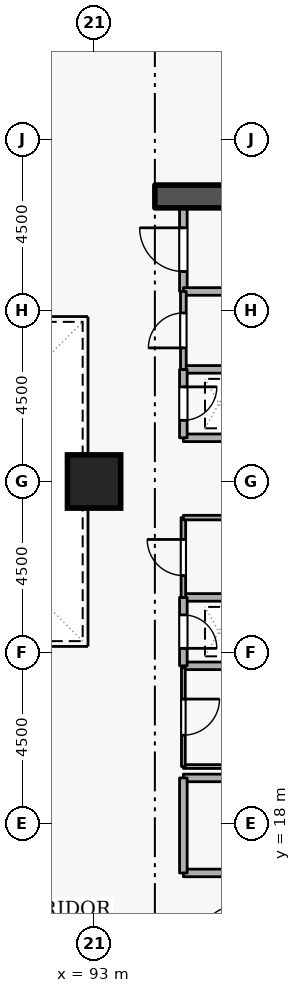
"""IFC4 building model, lengths in metres.
Left out: names, types, materials, properties, quantities, classifications, styles, units other than length and angle.
Written with IfcOpenShell. Run it as: python <this file> out.ifc"""

import sys

from ifc_helpers import new_model, si_unit, direction, frame, frame_2d, origin, origin_2d, place, context, subcontext, project, spatial, rectangle, extrude, element, fill, save


model = new_model("IFC4")
c1 = context("Model", 3, precision=1e-05, world=origin(), true_north=direction((0.0, 1.0)))
c2 = subcontext(c1, "Body", "Model", "MODEL_VIEW")
j1 = project(units=[si_unit("LENGTHUNIT", "METRE"), si_unit("PLANEANGLEUNIT", "RADIAN")], contexts=[c1])
p1 = place(None, origin())
s1 = spatial("IfcSite", under=j1, at=p1, CompositionType="ELEMENT")
p2 = place(p1, origin())
s2 = spatial("IfcBuilding", under=s1, at=p2, CompositionType="ELEMENT")
p3 = place(p2, frame((0.0, 0.0, 9.6)))
s3 = spatial("IfcBuildingStorey", under=s2, at=p3, CompositionType="ELEMENT", Elevation=9.6)
p4 = place(p3, frame((94.6, 34.5, 0.0), z_axis=(0.0, 0.0, 1.0), x_axis=(1.0, 0.0, 0.0)))
e1 = element("IfcWall", 1, at=p4, inside=s3, PredefinedType="SHEAR", context=c2, shape_type="SweptSolid", body=[
    extrude(rectangle(XDim=5.7, YDim=0.6, at=frame_2d((2.85, 0.0))), origin(), (0.0, 0.0, 1.0), 4.5),
])
p5 = place(p3, frame((93.0, 27.0, 0.0), z_axis=(0.0, 0.0, 1.0), x_axis=(1.0, 0.0, 0.0)))
e2 = element("IfcColumn", 2, at=p5, inside=s3, PredefinedType="COLUMN", context=c2, shape_type="SweptSolid", body=[
    extrude(rectangle(XDim=1.4, YDim=1.4, at=origin_2d()), origin(), (0.0, 0.0, 1.0), 4.5),
])
p6 = place(p3, frame((95.35, 16.7, 0.0), z_axis=(0.0, 0.0, 1.0), x_axis=(1.0, 0.0, 0.0)))
e3 = element("IfcWall", 3, at=p6, inside=s3, PredefinedType="STANDARD", context=c2, shape_type="SweptSolid", body=[
    extrude(rectangle(XDim=5.15, YDim=0.2, at=frame_2d((2.575, 0.0))), origin(), (0.0, 0.0, 1.0), 4.16),
])
p7 = place(p6, frame((2.0, 0.0, 0.0)))
e4 = element("IfcOpeningElement", 4, at=p7, cuts=e3, PredefinedType="OPENING", context=c2, shape_type="SweptSolid", body=[
    extrude(rectangle(XDim=1.15, YDim=2.1, at=frame_2d((0.575, 1.05))), frame((0.0, 0.11, 0.0), z_axis=(0.0, -1.0, 0.0), x_axis=(1.0, 0.0, 0.0)), (0.0, 0.0, 1.0), 0.22),
])
p8 = place(p3, frame((97.1, 19.2, 0.0), z_axis=(0.0, 0.0, 1.0), x_axis=(-1.0, 0.0, 0.0)))
e5 = element("IfcWall", 5, at=p8, inside=s3, PredefinedType="STANDARD", context=c2, shape_type="SweptSolid", body=[
    extrude(rectangle(XDim=1.75, YDim=0.2, at=frame_2d((0.875, 0.0))), origin(), (0.0, 0.0, 1.0), 3.365),
])
p9 = place(p3, frame((95.35, 19.2, 0.0), z_axis=(0.0, 0.0, 1.0), x_axis=(0.0, -1.0, 0.0)))
e6 = element("IfcWall", 6, at=p9, inside=s3, PredefinedType="STANDARD", context=c2, shape_type="SweptSolid", body=[
    extrude(rectangle(XDim=2.5, YDim=0.2, at=frame_2d((1.25, 0.0))), origin(), (0.0, 0.0, 1.0), 4.16),
])
for number, where, z_axis, x_axis in (
    (7, (95.35, 28.15, 0.0), (0.0, 0.0, 1.0), (1.0, 0.0, 0.0)),
    (8, (96.85, 29.95, 0.0), (0.0, 0.0, 1.0), (-1.0, 0.0, 0.0)),
):
    element("IfcWall", number, at=place(p3, frame(where, z_axis=z_axis, x_axis=x_axis)), inside=s3, PredefinedType="STANDARD", context=c2, shape_type="SweptSolid", body=[
        extrude(rectangle(XDim=1.5, YDim=0.2, at=frame_2d((0.75, 0.0))), origin(), (0.0, 0.0, 1.0), 4.16),
    ])
p10 = place(p3, frame((95.35, 29.95, 0.0), z_axis=(0.0, 0.0, 1.0), x_axis=(0.0, -1.0, 0.0)))
e9 = element("IfcWall", 9, at=p10, inside=s3, PredefinedType="STANDARD", context=c2, shape_type="SweptSolid", body=[
    extrude(rectangle(XDim=1.8, YDim=0.2, at=frame_2d((0.9, 0.0))), origin(), (0.0, 0.0, 1.0), 4.16),
])
p11 = place(p10, frame((0.46, 0.0, 0.0)))
e10 = element("IfcOpeningElement", 10, at=p11, cuts=e9, PredefinedType="OPENING", context=c2, shape_type="SweptSolid", body=[
    extrude(rectangle(XDim=0.88, YDim=2.04, at=frame_2d((0.44, 1.02))), frame((0.0, 0.11, 0.0), z_axis=(0.0, -1.0, 0.0), x_axis=(1.0, 0.0, 0.0)), (0.0, 0.0, 1.0), 0.22),
])
for number, where, z_axis, x_axis in (
    (11, (95.35, 22.15, 0.0), (0.0, 0.0, 1.0), (1.0, 0.0, 0.0)),
    (12, (96.85, 23.95, 0.0), (0.0, 0.0, 1.0), (-1.0, 0.0, 0.0)),
):
    element("IfcWall", number, at=place(p3, frame(where, z_axis=z_axis, x_axis=x_axis)), inside=s3, PredefinedType="STANDARD", context=c2, shape_type="SweptSolid", body=[
        extrude(rectangle(XDim=1.5, YDim=0.2, at=frame_2d((0.75, 0.0))), origin(), (0.0, 0.0, 1.0), 4.16),
    ])
p12 = place(p3, frame((95.35, 23.95, 0.0), z_axis=(0.0, 0.0, 1.0), x_axis=(0.0, -1.0, 0.0)))
e13 = element("IfcWall", 13, at=p12, inside=s3, PredefinedType="STANDARD", context=c2, shape_type="SweptSolid", body=[
    extrude(rectangle(XDim=1.8, YDim=0.2, at=frame_2d((0.9, 0.0))), origin(), (0.0, 0.0, 1.0), 4.16),
])
p13 = place(p12, frame((0.46, 0.0, 0.0)))
e14 = element("IfcOpeningElement", 14, at=p13, cuts=e13, PredefinedType="OPENING", context=c2, shape_type="SweptSolid", body=[
    extrude(rectangle(XDim=0.88, YDim=2.04, at=frame_2d((0.44, 1.02))), frame((0.0, 0.11, 0.0), z_axis=(0.0, -1.0, 0.0), x_axis=(1.0, 0.0, 0.0)), (0.0, 0.0, 1.0), 0.22),
])
p14 = place(p3, frame((95.35, 32.0, 0.0), z_axis=(0.0, 0.0, 1.0), x_axis=(0.0, 1.0, 0.0)))
e15 = element("IfcWall", 15, at=p14, inside=s3, PredefinedType="STANDARD", context=c2, shape_type="SweptSolid", body=[
    extrude(rectangle(XDim=2.2, YDim=0.2, at=frame_2d((1.1, 0.0))), origin(), (0.0, 0.0, 1.0), 4.16),
])
p15 = place(p14, frame((0.525, 0.0, 0.0)))
e16 = element("IfcOpeningElement", 16, at=p15, cuts=e15, PredefinedType="OPENING", context=c2, shape_type="SweptSolid", body=[
    extrude(rectangle(XDim=1.15, YDim=2.1, at=frame_2d((0.575, 1.05))), frame((0.0, 0.11, 0.0), z_axis=(0.0, -1.0, 0.0), x_axis=(1.0, 0.0, 0.0)), (0.0, 0.0, 1.0), 0.22),
])
p16 = place(p3, frame((96.85, 32.0, 0.0), z_axis=(0.0, 0.0, 1.0), x_axis=(-1.0, 0.0, 0.0)))
e17 = element("IfcWall", 17, at=p16, inside=s3, PredefinedType="STANDARD", context=c2, shape_type="SweptSolid", body=[
    extrude(rectangle(XDim=1.5, YDim=0.2, at=frame_2d((0.75, 0.0))), origin(), (0.0, 0.0, 1.0), 4.16),
])
p17 = place(p3, frame((95.35, 19.5, 0.0), z_axis=(0.0, 0.0, 1.0), x_axis=(1.0, 0.0, 0.0)))
e18 = element("IfcWall", 18, at=p17, inside=s3, PredefinedType="PARTITIONING", context=c2, shape_type="SweptSolid", body=[
    extrude(rectangle(XDim=1.5, YDim=0.1, at=frame_2d((0.75, 0.0))), origin(), (0.0, 0.0, 1.0), 3.365),
])
p18 = place(p3, frame((95.35, 22.1, 0.0), z_axis=(0.0, 0.0, 1.0), x_axis=(0.0, -1.0, 0.0)))
e19 = element("IfcWall", 19, at=p18, inside=s3, PredefinedType="PARTITIONING", context=c2, shape_type="SweptSolid", body=[
    extrude(rectangle(XDim=2.6, YDim=0.1, at=frame_2d((1.3, 0.0))), origin(), (0.0, 0.0, 1.0), 4.16),
])
p19 = place(p18, frame((0.825, 0.0, 0.0)))
e20 = element("IfcOpeningElement", 20, at=p19, cuts=e19, PredefinedType="OPENING", context=c2, shape_type="SweptSolid", body=[
    extrude(rectangle(XDim=0.95, YDim=2.1, at=frame_2d((0.475, 1.05))), frame((0.0, 0.06, 0.0), z_axis=(0.0, -1.0, 0.0), x_axis=(1.0, 0.0, 0.0)), (0.0, 0.0, 1.0), 0.12),
])
p20 = place(p3, frame((95.35, 23.95, 0.0), z_axis=(0.0, 0.0, 1.0), x_axis=(0.0, 1.0, 0.0)))
e21 = element("IfcWall", 21, at=p20, inside=s3, PredefinedType="PARTITIONING", context=c2, shape_type="SweptSolid", body=[
    extrude(rectangle(XDim=2.1, YDim=0.12, at=frame_2d((1.05, 0.0))), origin(), (0.0, 0.0, 1.0), 4.16),
])
p21 = place(p20, frame((0.575, 0.0, 0.0)))
e22 = element("IfcOpeningElement", 22, at=p21, cuts=e21, PredefinedType="OPENING", context=c2, shape_type="SweptSolid", body=[
    extrude(rectangle(XDim=0.95, YDim=2.1, at=frame_2d((0.475, 1.05))), frame((0.0, 0.07, 0.0), z_axis=(0.0, -1.0, 0.0), x_axis=(1.0, 0.0, 0.0)), (0.0, 0.0, 1.0), 0.14),
])
p22 = place(p3, frame((95.35, 26.05, 0.0), z_axis=(0.0, 0.0, 1.0), x_axis=(1.0, 0.0, 0.0)))
e23 = element("IfcWall", 23, at=p22, inside=s3, PredefinedType="PARTITIONING", context=c2, shape_type="SweptSolid", body=[
    extrude(rectangle(XDim=1.5, YDim=0.12, at=frame_2d((0.75, 0.0))), origin(), (0.0, 0.0, 1.0), 4.16),
])
p23 = place(p3, frame((95.35, 29.95, 0.0), z_axis=(0.0, 0.0, 1.0), x_axis=(0.0, 1.0, 0.0)))
e24 = element("IfcWall", 24, at=p23, inside=s3, PredefinedType="PARTITIONING", context=c2, shape_type="SweptSolid", body=[
    extrude(rectangle(XDim=2.05, YDim=0.15, at=frame_2d((1.025, 0.0))), origin(), (0.0, 0.0, 1.0), 4.16),
])
p24 = place(p23, frame((0.565, 0.0, 0.0)))
e25 = element("IfcOpeningElement", 25, at=p24, cuts=e24, PredefinedType="OPENING", context=c2, shape_type="SweptSolid", body=[
    extrude(rectangle(XDim=0.92, YDim=2.08, at=frame_2d((0.46, 1.04))), frame((0.0, 0.085, 0.0), z_axis=(0.0, -1.0, 0.0), x_axis=(1.0, 0.0, 0.0)), (0.0, 0.0, 1.0), 0.17),
])
p25 = place(p11, origin())
e26 = element("IfcDoor", 26, at=p25, inside=s3, OperationType="SINGLE_SWING_LEFT", PredefinedType="DOOR", context=c2, shape_type="SweptSolid", body=[
    extrude(rectangle(XDim=0.88, YDim=2.04, at=frame_2d((0.44, 1.02))), frame((0.0, 0.025, 0.0), z_axis=(0.0, -1.0, 0.0), x_axis=(1.0, 0.0, 0.0)), (0.0, 0.0, 1.0), 0.05),
])
fill(e10, e26)
p26 = place(p13, origin())
e27 = element("IfcDoor", 27, at=p26, inside=s3, OperationType="SINGLE_SWING_RIGHT", PredefinedType="DOOR", context=c2, shape_type="SweptSolid", body=[
    extrude(rectangle(XDim=0.88, YDim=2.04, at=frame_2d((0.44, 1.02))), frame((0.0, 0.025, 0.0), z_axis=(0.0, -1.0, 0.0), x_axis=(1.0, 0.0, 0.0)), (0.0, 0.0, 1.0), 0.05),
])
fill(e14, e27)
p27 = place(p19, origin())
e28 = element("IfcDoor", 28, at=p27, inside=s3, OperationType="SINGLE_SWING_LEFT", PredefinedType="DOOR", context=c2, shape_type="SweptSolid", body=[
    extrude(rectangle(XDim=0.95, YDim=2.1, at=frame_2d((0.475, 1.05))), frame((0.0, 0.025, 0.0), z_axis=(0.0, -1.0, 0.0), x_axis=(1.0, 0.0, 0.0)), (0.0, 0.0, 1.0), 0.05),
])
fill(e20, e28)
p28 = place(p21, origin())
e29 = element("IfcDoor", 29, at=p28, inside=s3, OperationType="SINGLE_SWING_RIGHT", PredefinedType="DOOR", context=c2, shape_type="SweptSolid", body=[
    extrude(rectangle(XDim=0.95, YDim=2.1, at=frame_2d((0.475, 1.05))), frame((0.0, 0.025, 0.0), z_axis=(0.0, -1.0, 0.0), x_axis=(1.0, 0.0, 0.0)), (0.0, 0.0, 1.0), 0.05),
])
fill(e22, e29)
p29 = place(p24, origin())
e30 = element("IfcDoor", 30, at=p29, inside=s3, OperationType="SINGLE_SWING_LEFT", PredefinedType="DOOR", context=c2, shape_type="SweptSolid", body=[
    extrude(rectangle(XDim=0.92, YDim=2.08, at=frame_2d((0.46, 1.04))), frame((0.0, 0.025, 0.0), z_axis=(0.0, -1.0, 0.0), x_axis=(1.0, 0.0, 0.0)), (0.0, 0.0, 1.0), 0.05),
])
fill(e25, e30)
p30 = place(p15, origin())
e31 = element("IfcDoor", 31, at=p30, inside=s3, OperationType="SINGLE_SWING_RIGHT", PredefinedType="DOOR", context=c2, shape_type="SweptSolid", body=[
    extrude(rectangle(XDim=1.15, YDim=2.1, at=frame_2d((0.575, 1.05))), frame((0.0, 0.025, 0.0), z_axis=(0.0, -1.0, 0.0), x_axis=(1.0, 0.0, 0.0)), (0.0, 0.0, 1.0), 0.05),
])
fill(e16, e31)
save(model, sys.argv[1])
